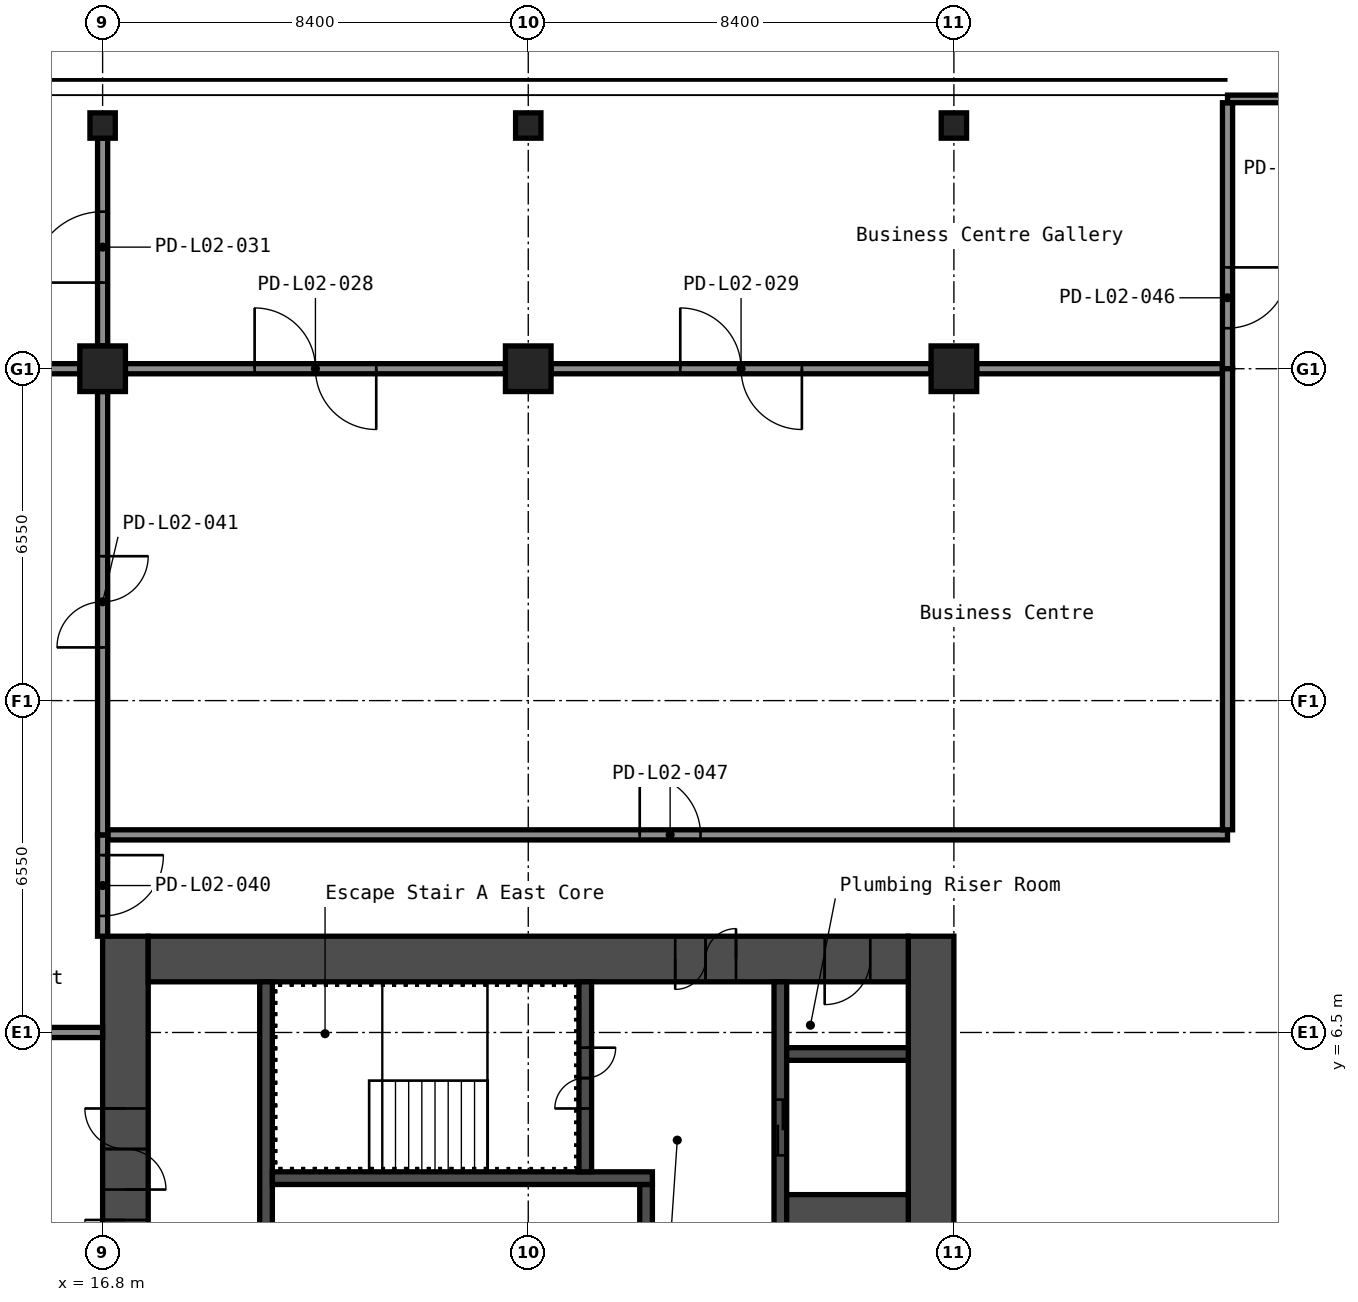
"""IFC4 building model, lengths in metres.
Left out: names, types, materials, properties, quantities, classifications, styles, units other than length and angle.
Written with IfcOpenShell. Run it as: python <this file> out.ifc"""

import sys

from ifc_helpers import new_model, si_unit, direction, frame, frame_2d, origin, origin_2d, place, context, subcontext, project, spatial, rectangle, hollow_rectangle, extrude, element, fill, save


model = new_model("IFC4")
c1 = context("Model", 3, precision=1e-05, world=origin(), true_north=direction((0.0, 1.0)))
c2 = subcontext(c1, "Body", "Model", "MODEL_VIEW")
j1 = project(units=[si_unit("LENGTHUNIT", "METRE"), si_unit("PLANEANGLEUNIT", "RADIAN")], contexts=[c1])
p1 = place(None, origin())
s1 = spatial("IfcSite", under=j1, at=p1, CompositionType="ELEMENT")
p2 = place(p1, origin())
s2 = spatial("IfcBuilding", under=s1, at=p2, CompositionType="ELEMENT")
p3 = place(p2, frame((0.0, 0.0, 9.0)))
s3 = spatial("IfcBuildingStorey", under=s2, at=p3, CompositionType="ELEMENT", Elevation=9.0)
for number, where, z_axis, x_axis in (
    (1, (16.8, 19.6, 0.0), (0.0, 0.0, 1.0), (1.0, 0.0, 0.0)),
    (2, (25.2, 19.6, 0.0), (0.0, 0.0, 1.0), (1.0, 0.0, 0.0)),
    (3, (33.6, 19.6, 0.0), (0.0, 0.0, 1.0), (1.0, 0.0, 0.0)),
):
    element("IfcColumn", number, at=place(p3, frame(where, z_axis=z_axis, x_axis=x_axis)), inside=s3, PredefinedType="COLUMN", context=c2, shape_type="SweptSolid", body=[
        extrude(hollow_rectangle(XDim=0.9, YDim=0.9, WallThickness=0.036, at=origin_2d()), origin(), (0.0, 0.0, 1.0), 5.6),
    ])
for number, where, z_axis, x_axis in (
    (4, (16.8, 24.4, 0.0), (0.0, 0.0, 1.0), (1.0, 0.0, 0.0)),
    (5, (25.2, 24.4, 0.0), (0.0, 0.0, 1.0), (1.0, 0.0, 0.0)),
    (6, (33.6, 24.4, 0.0), (0.0, 0.0, 1.0), (1.0, 0.0, 0.0)),
):
    element("IfcColumn", number, at=place(p3, frame(where, z_axis=z_axis, x_axis=x_axis)), inside=s3, PredefinedType="COLUMN", context=c2, shape_type="SweptSolid", body=[
        extrude(hollow_rectangle(XDim=0.5, YDim=0.5, WallThickness=0.019, InnerFilletRadius=0.029, OuterFilletRadius=0.048, at=origin_2d()), origin(), (0.0, 0.0, 1.0), 5.6),
    ])
p4 = place(p3, frame((17.25, -8.4, 0.0), z_axis=(0.0, 0.0, 1.0), x_axis=(0.0, 1.0, 0.0)))
e7 = element("IfcWall", 7, at=p4, inside=s3, PredefinedType="SHEAR", context=c2, shape_type="SweptSolid", body=[
    extrude(rectangle(XDim=16.8, YDim=0.9, at=frame_2d((8.4, 0.0))), origin(), (0.0, 0.0, 1.0), 5.6),
])
p5 = place(p4, frame((3.4, 0.0, 0.0)))
e8 = element("IfcOpeningElement", 8, at=p5, cuts=e7, PredefinedType="OPENING", context=c2, shape_type="SweptSolid", body=[
    extrude(rectangle(XDim=1.6, YDim=2.1, at=frame_2d((0.8, 1.05))), frame((0.0, 0.46, 0.0), z_axis=(0.0, -1.0, 0.0), x_axis=(1.0, 0.0, 0.0)), (0.0, 0.0, 1.0), 0.92),
])
p6 = place(p4, frame((9.6, 0.0, 0.0)))
e9 = element("IfcOpeningElement", 9, at=p6, cuts=e7, PredefinedType="OPENING", context=c2, shape_type="SweptSolid", body=[
    extrude(rectangle(XDim=1.6, YDim=2.1, at=frame_2d((0.8, 1.05))), frame((0.0, 0.46, 0.0), z_axis=(0.0, -1.0, 0.0), x_axis=(1.0, 0.0, 0.0)), (0.0, 0.0, 1.0), 0.92),
])
p7 = place(p4, frame((11.8, 0.0, 0.0)))
e10 = element("IfcOpeningElement", 10, at=p7, cuts=e7, PredefinedType="OPENING", context=c2, shape_type="SweptSolid", body=[
    extrude(rectangle(XDim=1.6, YDim=2.1, at=frame_2d((0.8, 1.05))), frame((0.0, 0.46, 0.0), z_axis=(0.0, -1.0, 0.0), x_axis=(1.0, 0.0, 0.0)), (0.0, 0.0, 1.0), 0.92),
])
p8 = place(p3, frame((33.15, -8.4, 0.0), z_axis=(0.0, 0.0, 1.0), x_axis=(0.0, 1.0, 0.0)))
e11 = element("IfcWall", 11, at=p8, inside=s3, PredefinedType="SHEAR", context=c2, shape_type="SweptSolid", body=[
    extrude(rectangle(XDim=16.8, YDim=0.9, at=frame_2d((8.4, 0.0))), origin(), (0.0, 0.0, 1.0), 5.6),
])
p9 = place(p3, frame((17.7, 7.95, 0.0), z_axis=(0.0, 0.0, 1.0), x_axis=(1.0, 0.0, 0.0)))
e12 = element("IfcWall", 12, at=p9, inside=s3, PredefinedType="SHEAR", context=c2, shape_type="SweptSolid", body=[
    extrude(rectangle(XDim=15.0, YDim=0.9, at=frame_2d((7.5, 0.0))), origin(), (0.0, 0.0, 1.0), 5.6),
])
p10 = place(p9, frame((10.4, 0.0, 0.0)))
e13 = element("IfcOpeningElement", 13, at=p10, cuts=e12, PredefinedType="OPENING", context=c2, shape_type="SweptSolid", body=[
    extrude(rectangle(XDim=1.2, YDim=2.1, at=frame_2d((0.6, 1.05))), frame((0.0, 0.46, 0.0), z_axis=(0.0, -1.0, 0.0), x_axis=(1.0, 0.0, 0.0)), (0.0, 0.0, 1.0), 0.92),
])
p11 = place(p9, frame((13.35, 0.0, 0.0)))
e14 = element("IfcOpeningElement", 14, at=p11, cuts=e12, PredefinedType="OPENING", context=c2, shape_type="SweptSolid", body=[
    extrude(rectangle(XDim=0.9, YDim=2.1, at=frame_2d((0.45, 1.05))), frame((0.0, 0.46, 0.0), z_axis=(0.0, -1.0, 0.0), x_axis=(1.0, 0.0, 0.0)), (0.0, 0.0, 1.0), 0.92),
])
p12 = place(p3, frame((20.025, 1.2, 0.0), z_axis=(0.0, 0.0, 1.0), x_axis=(0.0, 1.0, 0.0)))
e15 = element("IfcWall", 15, at=p12, inside=s3, PredefinedType="SHEAR", context=c2, shape_type="SweptSolid", body=[
    extrude(rectangle(XDim=6.3, YDim=0.25, at=frame_2d((3.15, 0.0))), origin(), (0.0, 0.0, 1.0), 5.6),
])
p13 = place(p3, frame((27.525, 1.45, 0.0), z_axis=(0.0, 0.0, 1.0), x_axis=(0.0, 1.0, 0.0)))
e16 = element("IfcWall", 16, at=p13, inside=s3, PredefinedType="SHEAR", context=c2, shape_type="SweptSolid", body=[
    extrude(rectangle(XDim=2.05, YDim=0.25, at=frame_2d((1.025, 0.0))), origin(), (0.0, 0.0, 1.0), 5.6),
])
p14 = place(p3, frame((20.15, 3.625, 0.0), z_axis=(0.0, 0.0, 1.0), x_axis=(1.0, 0.0, 0.0)))
e17 = element("IfcWall", 17, at=p14, inside=s3, PredefinedType="SHEAR", context=c2, shape_type="SweptSolid", body=[
    extrude(rectangle(XDim=7.5, YDim=0.25, at=frame_2d((3.75, 0.0))), origin(), (0.0, 0.0, 1.0), 5.6),
])
p15 = place(p3, frame((26.325, 3.75, 0.0), z_axis=(0.0, 0.0, 1.0), x_axis=(0.0, 1.0, 0.0)))
e18 = element("IfcWall", 18, at=p15, inside=s3, PredefinedType="SHEAR", context=c2, shape_type="SweptSolid", body=[
    extrude(rectangle(XDim=3.75, YDim=0.25, at=frame_2d((1.875, 0.0))), origin(), (0.0, 0.0, 1.0), 5.6),
])
p16 = place(p15, frame((1.25, 0.0, 0.0)))
e19 = element("IfcOpeningElement", 19, at=p16, cuts=e18, PredefinedType="OPENING", context=c2, shape_type="SweptSolid", body=[
    extrude(rectangle(XDim=1.2, YDim=2.1, at=frame_2d((0.6, 1.05))), frame((0.0, 0.135, 0.0), z_axis=(0.0, -1.0, 0.0), x_axis=(1.0, 0.0, 0.0)), (0.0, 0.0, 1.0), 0.27),
])
p17 = place(p3, frame((30.175, 1.45, 0.0), z_axis=(0.0, 0.0, 1.0), x_axis=(0.0, 1.0, 0.0)))
e20 = element("IfcWall", 20, at=p17, inside=s3, PredefinedType="SHEAR", context=c2, shape_type="SweptSolid", body=[
    extrude(rectangle(XDim=6.05, YDim=0.25, at=frame_2d((3.025, 0.0))), origin(), (0.0, 0.0, 1.0), 5.6),
])
p18 = place(p17, frame((2.625, 0.0, 0.0)))
e21 = element("IfcOpeningElement", 21, at=p18, cuts=e20, PredefinedType="OPENING", context=c2, shape_type="SweptSolid", body=[
    extrude(rectangle(XDim=1.1, YDim=2.1, at=frame_2d((0.55, 1.05))), frame((0.0, 0.135, 0.0), z_axis=(0.0, -1.0, 0.0), x_axis=(1.0, 0.0, 0.0)), (0.0, 0.0, 1.0), 0.27),
])
p19 = place(p3, frame((30.3, 2.375, 0.0), z_axis=(0.0, 0.0, 1.0), x_axis=(1.0, 0.0, 0.0)))
e22 = element("IfcWall", 22, at=p19, inside=s3, PredefinedType="SHEAR", context=c2, shape_type="SweptSolid", body=[
    extrude(rectangle(XDim=2.4, YDim=1.85, at=frame_2d((1.2, 0.0))), origin(), (0.0, 0.0, 1.0), 5.6),
])
p20 = place(p3, frame((30.3, 6.075, 0.0), z_axis=(0.0, 0.0, 1.0), x_axis=(1.0, 0.0, 0.0)))
e23 = element("IfcWall", 23, at=p20, inside=s3, PredefinedType="SHEAR", context=c2, shape_type="SweptSolid", body=[
    extrude(rectangle(XDim=2.4, YDim=0.25, at=frame_2d((1.2, 0.0))), origin(), (0.0, 0.0, 1.0), 5.6),
])
p21 = place(p3, frame((16.8, 24.15, 0.0), z_axis=(0.0, 0.0, 1.0), x_axis=(0.0, -1.0, 0.0)))
e24 = element("IfcWall", 24, at=p21, inside=s3, PredefinedType="PARTITIONING", context=c2, shape_type="SweptSolid", body=[
    extrude(rectangle(XDim=4.1, YDim=0.2, at=frame_2d((2.05, 0.0))), origin(), (0.0, 0.0, 1.0), 5.6),
])
p22 = place(p21, frame((1.45, 0.0, 0.0)))
e25 = element("IfcOpeningElement", 25, at=p22, cuts=e24, PredefinedType="OPENING", context=c2, shape_type="SweptSolid", body=[
    extrude(rectangle(XDim=1.4, YDim=2.1, at=frame_2d((0.7, 1.05))), frame((0.0, 0.11, 0.0), z_axis=(0.0, -1.0, 0.0), x_axis=(1.0, 0.0, 0.0)), (0.0, 0.0, 1.0), 0.22),
])
p23 = place(p3, frame((17.25, 19.6, 0.0), z_axis=(0.0, 0.0, 1.0), x_axis=(1.0, 0.0, 0.0)))
e26 = element("IfcWall", 26, at=p23, inside=s3, PredefinedType="PARTITIONING", context=c2, shape_type="SweptSolid", body=[
    extrude(rectangle(XDim=7.5, YDim=0.2, at=frame_2d((3.75, 0.0))), origin(), (0.0, 0.0, 1.0), 5.6),
])
p24 = place(p23, frame((2.55, 0.0, 0.0)))
e27 = element("IfcOpeningElement", 27, at=p24, cuts=e26, PredefinedType="OPENING", context=c2, shape_type="SweptSolid", body=[
    extrude(rectangle(XDim=2.4, YDim=2.1, at=frame_2d((1.2, 1.05))), frame((0.0, 0.11, 0.0), z_axis=(0.0, -1.0, 0.0), x_axis=(1.0, 0.0, 0.0)), (0.0, 0.0, 1.0), 0.22),
])
p25 = place(p3, frame((25.65, 19.6, 0.0), z_axis=(0.0, 0.0, 1.0), x_axis=(1.0, 0.0, 0.0)))
e28 = element("IfcWall", 28, at=p25, inside=s3, PredefinedType="PARTITIONING", context=c2, shape_type="SweptSolid", body=[
    extrude(rectangle(XDim=7.5, YDim=0.2, at=frame_2d((3.75, 0.0))), origin(), (0.0, 0.0, 1.0), 5.6),
])
p26 = place(p25, frame((2.55, 0.0, 0.0)))
e29 = element("IfcOpeningElement", 29, at=p26, cuts=e28, PredefinedType="OPENING", context=c2, shape_type="SweptSolid", body=[
    extrude(rectangle(XDim=2.4, YDim=2.1, at=frame_2d((1.2, 1.05))), frame((0.0, 0.11, 0.0), z_axis=(0.0, -1.0, 0.0), x_axis=(1.0, 0.0, 0.0)), (0.0, 0.0, 1.0), 0.22),
])
p27 = place(p3, frame((34.05, 19.6, 0.0), z_axis=(0.0, 0.0, 1.0), x_axis=(1.0, 0.0, 0.0)))
e30 = element("IfcWall", 30, at=p27, inside=s3, PredefinedType="PARTITIONING", context=c2, shape_type="SweptSolid", body=[
    extrude(rectangle(XDim=4.85, YDim=0.2, at=frame_2d((2.425, 0.0))), origin(), (0.0, 0.0, 1.0), 5.6),
])
p28 = place(p3, frame((39.0, 19.6, 0.0), z_axis=(0.0, 0.0, 1.0), x_axis=(0.0, 1.0, 0.0)))
e31 = element("IfcWall", 31, at=p28, inside=s3, PredefinedType="PARTITIONING", context=c2, shape_type="SweptSolid", body=[
    extrude(rectangle(XDim=5.25, YDim=0.2, at=frame_2d((2.625, 0.0))), origin(), (0.0, 0.0, 1.0), 5.6),
])
p29 = place(p28, frame((0.8, 0.0, 0.0)))
e32 = element("IfcOpeningElement", 32, at=p29, cuts=e31, PredefinedType="OPENING", context=c2, shape_type="SweptSolid", body=[
    extrude(rectangle(XDim=1.2, YDim=2.1, at=frame_2d((0.6, 1.05))), frame((0.0, 0.11, 0.0), z_axis=(0.0, -1.0, 0.0), x_axis=(1.0, 0.0, 0.0)), (0.0, 0.0, 1.0), 0.22),
])
p30 = place(p3, frame((16.9, 10.4, 0.0), z_axis=(0.0, 0.0, 1.0), x_axis=(1.0, 0.0, 0.0)))
e33 = element("IfcWall", 33, at=p30, inside=s3, PredefinedType="PARTITIONING", context=c2, shape_type="SweptSolid", body=[
    extrude(rectangle(XDim=22.1, YDim=0.2, at=frame_2d((11.05, 0.0))), origin(), (0.0, 0.0, 1.0), 5.6),
])
p31 = place(p30, frame((10.5, 0.0, 0.0)))
e34 = element("IfcOpeningElement", 34, at=p31, cuts=e33, PredefinedType="OPENING", context=c2, shape_type="SweptSolid", body=[
    extrude(rectangle(XDim=1.2, YDim=2.1, at=frame_2d((0.6, 1.05))), frame((0.0, 0.11, 0.0), z_axis=(0.0, -1.0, 0.0), x_axis=(1.0, 0.0, 0.0)), (0.0, 0.0, 1.0), 0.22),
])
p32 = place(p3, frame((39.0, 10.5, 0.0), z_axis=(0.0, 0.0, 1.0), x_axis=(0.0, 1.0, 0.0)))
e35 = element("IfcWall", 35, at=p32, inside=s3, PredefinedType="PARTITIONING", context=c2, shape_type="SweptSolid", body=[
    extrude(rectangle(XDim=9.1, YDim=0.2, at=frame_2d((4.55, 0.0))), origin(), (0.0, 0.0, 1.0), 5.6),
])
p33 = place(p3, frame((16.8, 8.4, 0.0), z_axis=(0.0, 0.0, 1.0), x_axis=(0.0, 1.0, 0.0)))
e36 = element("IfcWall", 36, at=p33, inside=s3, PredefinedType="PARTITIONING", context=c2, shape_type="SweptSolid", body=[
    extrude(rectangle(XDim=2.0, YDim=0.2, at=frame_2d((1.0, 0.0))), origin(), (0.0, 0.0, 1.0), 5.6),
])
p34 = place(p33, frame((0.4, 0.0, 0.0)))
e37 = element("IfcOpeningElement", 37, at=p34, cuts=e36, PredefinedType="OPENING", context=c2, shape_type="SweptSolid", body=[
    extrude(rectangle(XDim=1.2, YDim=2.1, at=frame_2d((0.6, 1.05))), frame((0.0, 0.11, 0.0), z_axis=(0.0, -1.0, 0.0), x_axis=(1.0, 0.0, 0.0)), (0.0, 0.0, 1.0), 0.22),
])
p35 = place(p3, frame((8.85, 19.6, 0.0), z_axis=(0.0, 0.0, 1.0), x_axis=(1.0, 0.0, 0.0)))
e38 = element("IfcWall", 38, at=p35, inside=s3, PredefinedType="PARTITIONING", context=c2, shape_type="SweptSolid", body=[
    extrude(rectangle(XDim=7.5, YDim=0.2, at=frame_2d((3.75, 0.0))), origin(), (0.0, 0.0, 1.0), 5.6),
])
p36 = place(p35, frame((2.55, 0.0, 0.0)))
e39 = element("IfcOpeningElement", 39, at=p36, cuts=e38, PredefinedType="OPENING", context=c2, shape_type="SweptSolid", body=[
    extrude(rectangle(XDim=2.4, YDim=2.1, at=frame_2d((1.2, 1.05))), frame((0.0, 0.11, 0.0), z_axis=(0.0, -1.0, 0.0), x_axis=(1.0, 0.0, 0.0)), (0.0, 0.0, 1.0), 0.22),
])
p37 = place(p3, frame((16.8, 19.15, 0.0), z_axis=(0.0, 0.0, 1.0), x_axis=(0.0, -1.0, 0.0)))
e40 = element("IfcWall", 40, at=p37, inside=s3, PredefinedType="PARTITIONING", context=c2, shape_type="SweptSolid", body=[
    extrude(rectangle(XDim=8.75, YDim=0.2, at=frame_2d((4.375, 0.0))), origin(), (0.0, 0.0, 1.0), 5.6),
])
p38 = place(p37, frame((3.25, 0.0, 0.0)))
e41 = element("IfcOpeningElement", 41, at=p38, cuts=e40, PredefinedType="OPENING", context=c2, shape_type="SweptSolid", body=[
    extrude(rectangle(XDim=1.8, YDim=2.1, at=frame_2d((0.9, 1.05))), frame((0.0, 0.11, 0.0), z_axis=(0.0, -1.0, 0.0), x_axis=(1.0, 0.0, 0.0)), (0.0, 0.0, 1.0), 0.22),
])
p39 = place(p3, frame((12.0, 6.5, 0.0), z_axis=(0.0, 0.0, 1.0), x_axis=(1.0, 0.0, 0.0)))
e42 = element("IfcWall", 42, at=p39, inside=s3, PredefinedType="PARTITIONING", context=c2, shape_type="SweptSolid", body=[
    extrude(rectangle(XDim=4.8, YDim=0.2, at=frame_2d((2.4, 0.0))), origin(), (0.0, 0.0, 1.0), 5.6),
])
p40 = place(p3, frame((39.0, 24.925, 0.0), z_axis=(0.0, 0.0, 1.0), x_axis=(1.0, 0.0, 0.0)))
e43 = element("IfcWall", 43, at=p40, inside=s3, PredefinedType="STANDARD", context=c2, shape_type="SweptSolid", body=[
    extrude(rectangle(XDim=12.98, YDim=0.15, at=frame_2d((6.49, 0.0))), origin(), (0.0, 0.0, 1.0), 5.6),
])
p41 = place(p6, origin())
e44 = element("IfcDoor", 44, at=p41, inside=s3, OperationType="DOUBLE_DOOR_SINGLE_SWING", PredefinedType="DOOR", context=c2, shape_type="SweptSolid", body=[
    extrude(rectangle(XDim=1.6, YDim=2.1, at=frame_2d((0.8, 1.05))), frame((0.0, 0.025, 0.0), z_axis=(0.0, -1.0, 0.0), x_axis=(1.0, 0.0, 0.0)), (0.0, 0.0, 1.0), 0.05),
])
fill(e9, e44)
p42 = place(p7, origin())
e45 = element("IfcDoor", 45, at=p42, inside=s3, OperationType="DOUBLE_DOOR_SINGLE_SWING", PredefinedType="DOOR", context=c2, shape_type="SweptSolid", body=[
    extrude(rectangle(XDim=1.6, YDim=2.1, at=frame_2d((0.8, 1.05))), frame((0.0, 0.025, 0.0), z_axis=(0.0, -1.0, 0.0), x_axis=(1.0, 0.0, 0.0)), (0.0, 0.0, 1.0), 0.05),
])
fill(e10, e45)
p43 = place(p10, origin())
e46 = element("IfcDoor", 46, at=p43, inside=s3, OperationType="DOUBLE_DOOR_SINGLE_SWING", PredefinedType="DOOR", context=c2, shape_type="SweptSolid", body=[
    extrude(rectangle(XDim=1.2, YDim=2.1, at=frame_2d((0.6, 1.05))), frame((0.0, 0.025, 0.0), z_axis=(0.0, -1.0, 0.0), x_axis=(1.0, 0.0, 0.0)), (0.0, 0.0, 1.0), 0.05),
])
fill(e13, e46)
p44 = place(p11, origin())
e47 = element("IfcDoor", 47, at=p44, inside=s3, OperationType="SINGLE_SWING_LEFT", PredefinedType="DOOR", context=c2, shape_type="SweptSolid", body=[
    extrude(rectangle(XDim=0.9, YDim=2.1, at=frame_2d((0.45, 1.05))), frame((0.0, 0.025, 0.0), z_axis=(0.0, -1.0, 0.0), x_axis=(1.0, 0.0, 0.0)), (0.0, 0.0, 1.0), 0.05),
])
fill(e14, e47)
p45 = place(p16, origin())
e48 = element("IfcDoor", 48, at=p45, inside=s3, OperationType="DOUBLE_DOOR_SINGLE_SWING", PredefinedType="DOOR", context=c2, shape_type="SweptSolid", body=[
    extrude(rectangle(XDim=1.2, YDim=2.1, at=frame_2d((0.6, 1.05))), frame((0.0, 0.025, 0.0), z_axis=(0.0, -1.0, 0.0), x_axis=(1.0, 0.0, 0.0)), (0.0, 0.0, 1.0), 0.05),
])
fill(e19, e48)
p46 = place(p18, origin())
e49 = element("IfcDoor", 49, at=p46, inside=s3, OperationType="DOUBLE_DOOR_SLIDING", PredefinedType="DOOR", context=c2, shape_type="SweptSolid", body=[
    extrude(rectangle(XDim=1.1, YDim=2.1, at=frame_2d((0.55, 1.05))), frame((0.0, 0.025, 0.0), z_axis=(0.0, -1.0, 0.0), x_axis=(1.0, 0.0, 0.0)), (0.0, 0.0, 1.0), 0.05),
])
fill(e21, e49)
p47 = place(p24, origin())
e50 = element("IfcDoor", 50, at=p47, inside=s3, OperationType="DOUBLE_DOOR_DOUBLE_SWING", PredefinedType="DOOR", context=c2, shape_type="SweptSolid", body=[
    extrude(rectangle(XDim=2.4, YDim=2.1, at=frame_2d((1.2, 1.05))), frame((0.0, 0.025, 0.0), z_axis=(0.0, -1.0, 0.0), x_axis=(1.0, 0.0, 0.0)), (0.0, 0.0, 1.0), 0.05),
])
fill(e27, e50)
p48 = place(p26, origin())
e51 = element("IfcDoor", 51, at=p48, inside=s3, OperationType="DOUBLE_DOOR_DOUBLE_SWING", PredefinedType="DOOR", context=c2, shape_type="SweptSolid", body=[
    extrude(rectangle(XDim=2.4, YDim=2.1, at=frame_2d((1.2, 1.05))), frame((0.0, 0.025, 0.0), z_axis=(0.0, -1.0, 0.0), x_axis=(1.0, 0.0, 0.0)), (0.0, 0.0, 1.0), 0.05),
])
fill(e29, e51)
p49 = place(p22, origin())
e52 = element("IfcDoor", 52, at=p49, inside=s3, OperationType="SINGLE_SWING_RIGHT", PredefinedType="DOOR", context=c2, shape_type="SweptSolid", body=[
    extrude(rectangle(XDim=1.4, YDim=2.1, at=frame_2d((0.7, 1.05))), frame((0.0, 0.025, 0.0), z_axis=(0.0, -1.0, 0.0), x_axis=(1.0, 0.0, 0.0)), (0.0, 0.0, 1.0), 0.05),
])
fill(e25, e52)
p50 = place(p34, origin())
e53 = element("IfcDoor", 53, at=p50, inside=s3, OperationType="SINGLE_SWING_RIGHT", PredefinedType="DOOR", context=c2, shape_type="SweptSolid", body=[
    extrude(rectangle(XDim=1.2, YDim=2.1, at=frame_2d((0.6, 1.05))), frame((0.0, 0.025, 0.0), z_axis=(0.0, -1.0, 0.0), x_axis=(1.0, 0.0, 0.0)), (0.0, 0.0, 1.0), 0.05),
])
fill(e37, e53)
p51 = place(p38, origin())
e54 = element("IfcDoor", 54, at=p51, inside=s3, OperationType="DOUBLE_DOOR_DOUBLE_SWING", PredefinedType="DOOR", context=c2, shape_type="SweptSolid", body=[
    extrude(rectangle(XDim=1.8, YDim=2.1, at=frame_2d((0.9, 1.05))), frame((0.0, 0.025, 0.0), z_axis=(0.0, -1.0, 0.0), x_axis=(1.0, 0.0, 0.0)), (0.0, 0.0, 1.0), 0.05),
])
fill(e41, e54)
p52 = place(p29, origin())
e55 = element("IfcDoor", 55, at=p52, inside=s3, OperationType="SINGLE_SWING_RIGHT", PredefinedType="DOOR", context=c2, shape_type="SweptSolid", body=[
    extrude(rectangle(XDim=1.2, YDim=2.1, at=frame_2d((0.6, 1.05))), frame((0.0, 0.025, 0.0), z_axis=(0.0, -1.0, 0.0), x_axis=(1.0, 0.0, 0.0)), (0.0, 0.0, 1.0), 0.05),
])
fill(e32, e55)
p53 = place(p31, origin())
e56 = element("IfcDoor", 56, at=p53, inside=s3, OperationType="SINGLE_SWING_RIGHT", PredefinedType="DOOR", context=c2, shape_type="SweptSolid", body=[
    extrude(rectangle(XDim=1.2, YDim=2.1, at=frame_2d((0.6, 1.05))), frame((0.0, 0.025, 0.0), z_axis=(0.0, -1.0, 0.0), x_axis=(1.0, 0.0, 0.0)), (0.0, 0.0, 1.0), 0.05),
])
fill(e34, e56)
save(model, sys.argv[1])
